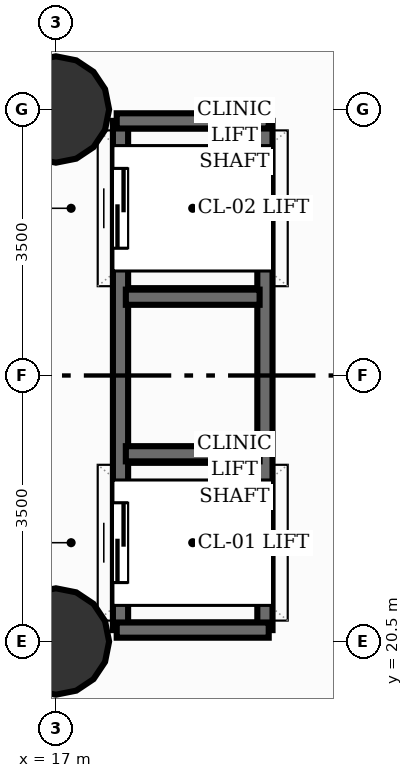
"""IFC4 building model, lengths in metres.
Left out: names, types, materials, properties, quantities, classifications, styles, units other than length and angle.
Written with IfcOpenShell. Run it as: python <this file> out.ifc"""

import sys

from ifc_helpers import new_model, si_unit, direction, frame, frame_2d, origin, origin_2d, place, context, subcontext, project, spatial, rectangle, circle, extrude, element, fill, save


model = new_model("IFC4")
c1 = context("Model", 3, precision=1e-05, world=origin(), true_north=direction((0.0, 1.0)))
c2 = subcontext(c1, "Body", "Model", "MODEL_VIEW")
j1 = project(units=[si_unit("LENGTHUNIT", "METRE"), si_unit("PLANEANGLEUNIT", "RADIAN")], contexts=[c1])
p1 = place(None, origin())
s1 = spatial("IfcSite", under=j1, at=p1, CompositionType="ELEMENT")
p2 = place(p1, origin())
s2 = spatial("IfcBuilding", under=s1, at=p2, CompositionType="ELEMENT")
p3 = place(p2, frame((0.0, 0.0, -4.5)))
s3 = spatial("IfcBuildingStorey", under=s2, at=p3, CompositionType="ELEMENT", Elevation=-4.5)
for number, where, z_axis, x_axis in (
    (1, (17.0, 20.5, 0.0), (0.0, 0.0, 1.0), (1.0, 0.0, 0.0)),
    (2, (17.0, 27.5, 0.0), (0.0, 0.0, 1.0), (1.0, 0.0, 0.0)),
):
    element("IfcColumn", number, at=place(p3, frame(where, z_axis=z_axis, x_axis=x_axis)), inside=s3, PredefinedType="COLUMN", context=c2, shape_type="SweptSolid", body=[
        extrude(circle(Radius=0.7, at=origin_2d()), origin(), (0.0, 0.0, 1.0), 4.5),
    ])
p4 = place(p3, frame((17.85, 20.65, 0.0), z_axis=(0.0, 0.0, 1.0), x_axis=(0.0, 1.0, 0.0)))
e3 = element("IfcWall", 3, at=p4, inside=s3, PredefinedType="SHEAR", context=c2, shape_type="SweptSolid", body=[
    extrude(rectangle(XDim=6.7, YDim=0.2, at=frame_2d((3.35, 0.0))), origin(), (0.0, 0.0, 1.0), 4.5),
])
p5 = place(p4, frame((0.625, 0.0, 0.0)))
e4 = element("IfcOpeningElement", 4, at=p5, cuts=e3, PredefinedType="OPENING", context=c2, shape_type="SweptSolid", body=[
    extrude(rectangle(XDim=1.05, YDim=2.15, at=frame_2d((0.525, 1.075))), frame((0.0, 0.11, 0.0), z_axis=(0.0, -1.0, 0.0), x_axis=(1.0, 0.0, 0.0)), (0.0, 0.0, 1.0), 0.22),
])
p6 = place(p4, frame((5.025, 0.0, 0.0)))
e5 = element("IfcOpeningElement", 5, at=p6, cuts=e3, PredefinedType="OPENING", context=c2, shape_type="SweptSolid", body=[
    extrude(rectangle(XDim=1.05, YDim=2.15, at=frame_2d((0.525, 1.075))), frame((0.0, 0.11, 0.0), z_axis=(0.0, -1.0, 0.0), x_axis=(1.0, 0.0, 0.0)), (0.0, 0.0, 1.0), 0.22),
])
p7 = place(p3, frame((19.75, 20.65, 0.0), z_axis=(0.0, 0.0, 1.0), x_axis=(0.0, 1.0, 0.0)))
e6 = element("IfcWall", 6, at=p7, inside=s3, PredefinedType="SHEAR", context=c2, shape_type="SweptSolid", body=[
    extrude(rectangle(XDim=6.7, YDim=0.2, at=frame_2d((3.35, 0.0))), origin(), (0.0, 0.0, 1.0), 4.5),
])
for number, where, z_axis, x_axis in (
    (7, (17.8, 20.65, 0.0), (0.0, 0.0, 1.0), (1.0, 0.0, 0.0)),
    (8, (17.8, 27.35, 0.0), (0.0, 0.0, 1.0), (1.0, 0.0, 0.0)),
):
    element("IfcWall", number, at=place(p3, frame(where, z_axis=z_axis, x_axis=x_axis)), inside=s3, PredefinedType="SHEAR", context=c2, shape_type="SweptSolid", body=[
        extrude(rectangle(XDim=2.0, YDim=0.2, at=frame_2d((1.0, 0.0))), origin(), (0.0, 0.0, 1.0), 4.5),
    ])
for number, where, z_axis, x_axis in (
    (9, (17.92, 22.97, 0.0), (0.0, 0.0, 1.0), (1.0, 0.0, 0.0)),
    (10, (17.92, 25.03, 0.0), (0.0, 0.0, 1.0), (1.0, 0.0, 0.0)),
):
    element("IfcWall", number, at=place(p3, frame(where, z_axis=z_axis, x_axis=x_axis)), inside=s3, PredefinedType="SHEAR", context=c2, shape_type="SweptSolid", body=[
        extrude(rectangle(XDim=1.76, YDim=0.2, at=frame_2d((0.88, 0.0))), origin(), (0.0, 0.0, 1.0), 4.5),
    ])
p8 = place(p5, origin())
e11 = element("IfcDoor", 11, at=p8, inside=s3, OperationType="DOUBLE_DOOR_SLIDING", PredefinedType="DOOR", context=c2, shape_type="SweptSolid", body=[
    extrude(rectangle(XDim=1.05, YDim=2.15, at=frame_2d((0.525, 1.075))), frame((0.0, 0.025, 0.0), z_axis=(0.0, -1.0, 0.0), x_axis=(1.0, 0.0, 0.0)), (0.0, 0.0, 1.0), 0.05),
])
fill(e4, e11)
p9 = place(p6, origin())
e12 = element("IfcDoor", 12, at=p9, inside=s3, OperationType="DOUBLE_DOOR_SLIDING", PredefinedType="DOOR", context=c2, shape_type="SweptSolid", body=[
    extrude(rectangle(XDim=1.05, YDim=2.15, at=frame_2d((0.525, 1.075))), frame((0.0, 0.025, 0.0), z_axis=(0.0, -1.0, 0.0), x_axis=(1.0, 0.0, 0.0)), (0.0, 0.0, 1.0), 0.05),
])
fill(e5, e12)
save(model, sys.argv[1])
